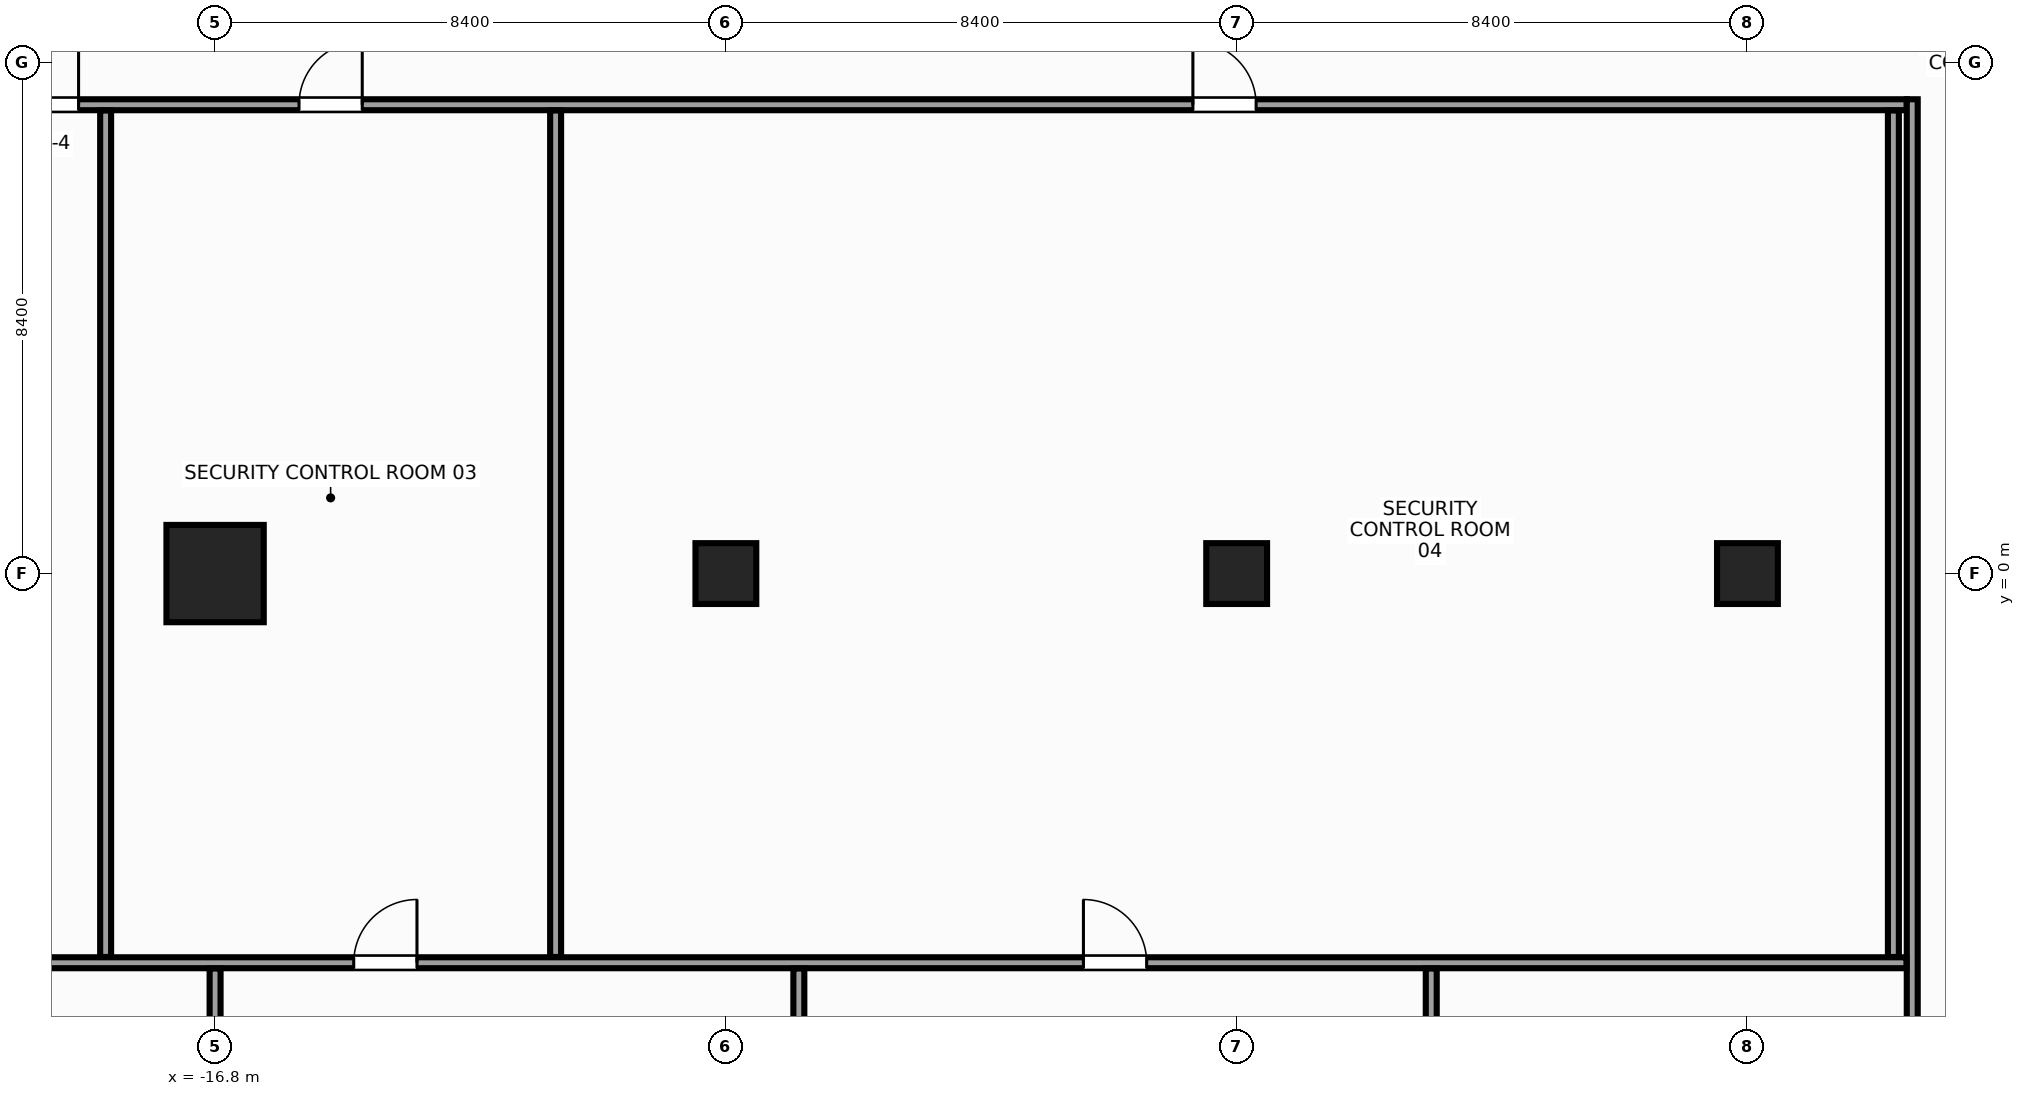
"""IFC4 building model, lengths in metres.
Left out: names, types, materials, properties, quantities, classifications, styles, units other than length and angle.
Written with IfcOpenShell. Run it as: python <this file> out.ifc"""

import sys

from ifc_helpers import new_model, si_unit, direction, frame, frame_2d, origin, origin_with_axes, origin_2d, place, context, subcontext, project, spatial, rectangle, hollow_rectangle, extrude, source, transform, mapped, element, fill, save


model = new_model("IFC4")
c1 = context("Model", 3, precision=1e-05, world=origin(), true_north=direction((0.0, 1.0)))
c2 = subcontext(c1, "Body", "Model", "MODEL_VIEW")
j1 = project(units=[si_unit("LENGTHUNIT", "METRE"), si_unit("PLANEANGLEUNIT", "RADIAN")], contexts=[c1])
p1 = place(None, origin())
s1 = spatial("IfcSite", under=j1, at=p1, CompositionType="ELEMENT")
p2 = place(p1, origin())
s2 = spatial("IfcBuilding", under=s1, at=p2, CompositionType="ELEMENT")
p3 = place(p2, frame((0.0, 0.0, 167.6)))
s3 = spatial("IfcBuildingStorey", under=s2, at=p3, CompositionType="ELEMENT", Elevation=167.6)
m1 = source(origin(), c2, "Body", "SweptSolid", [
    extrude(rectangle(XDim=1.6, YDim=1.6, at=origin_2d()), origin(), (0.0, 0.0, 1.0), 3.6),
])
p4 = place(p3, frame((-16.8, 0.0, 0.0), z_axis=(0.0, 0.0, 1.0), x_axis=(1.0, 0.0, 0.0)))
e1 = element("IfcColumn", 1, at=p4, inside=s3, PredefinedType="COLUMN", context=c2, shape_type="MappedRepresentation", body=[
    mapped(m1, transform((0.0, 0.0, 0.0), x_axis=(1.0, 0.0, 0.0), y_axis=(0.0, 1.0, 0.0), z_axis=(0.0, 0.0, 1.0), scale=1.0)),
])
m2 = source(origin(), c2, "Body", "SweptSolid", [
    extrude(hollow_rectangle(XDim=1.0, YDim=1.0, WallThickness=0.045, at=origin_2d()), origin(), (0.0, 0.0, 1.0), 3.6),
])
for number, where, z_axis, x_axis in (
    (2, (-8.4, 0.0, 0.0), (0.0, 0.0, 1.0), (1.0, 0.0, 0.0)),
    (3, (8.4, 0.0, 0.0), (0.0, 0.0, 1.0), (1.0, 0.0, 0.0)),
):
    element("IfcColumn", number, at=place(p3, frame(where, z_axis=z_axis, x_axis=x_axis)), inside=s3, PredefinedType="COLUMN", context=c2, shape_type="MappedRepresentation", body=[
        mapped(m2, transform((0.0, 0.0, 0.0), x_axis=(1.0, 0.0, 0.0), y_axis=(0.0, 1.0, 0.0), z_axis=(0.0, 0.0, 1.0), scale=1.0)),
    ])
m3 = source(origin(), c2, "Body", "SweptSolid", [
    extrude(rectangle(XDim=1.0, YDim=1.0, at=origin_2d()), origin(), (0.0, 0.0, 1.0), 3.6),
])
p5 = place(p3, origin_with_axes())
e4 = element("IfcColumn", 4, at=p5, inside=s3, PredefinedType="COLUMN", context=c2, shape_type="MappedRepresentation", body=[
    mapped(m3, transform((0.0, 0.0, 0.0), x_axis=(1.0, 0.0, 0.0), y_axis=(0.0, 1.0, 0.0), z_axis=(0.0, 0.0, 1.0), scale=1.0)),
])
m4 = source(origin(), c2, "Body", "SweptSolid", [
    extrude(rectangle(XDim=31.6, YDim=0.18, at=frame_2d((15.8, 0.0))), origin(), (0.0, 0.0, 1.0), 2.765),
])
p6 = place(p3, frame((-20.58, 7.71, 0.0), z_axis=(0.0, 0.0, 1.0), x_axis=(1.0, 0.0, 0.0)))
e5 = element("IfcWall", 5, at=p6, inside=s3, PredefinedType="PARTITIONING", context=c2, shape_type="MappedRepresentation", body=[
    mapped(m4, transform((0.0, 0.0, 0.0), x_axis=(1.0, 0.0, 0.0), y_axis=(0.0, 1.0, 0.0), z_axis=(0.0, 0.0, 1.0), scale=1.0)),
])
p7 = place(p6, frame((0.495, 0.0, 0.0)))
e6 = element("IfcOpeningElement", 6, at=p7, cuts=e5, PredefinedType="OPENING", context=c2, shape_type="SweptSolid", body=[
    extrude(rectangle(XDim=1.04, YDim=2.2, at=frame_2d((0.52, 1.1))), frame((0.0, 0.102, 0.0), z_axis=(0.0, -1.0, 0.0), x_axis=(1.0, 0.0, 0.0)), (0.0, 0.0, 1.0), 0.204),
])
p8 = place(p6, frame((5.16, 0.0, 0.0)))
e7 = element("IfcOpeningElement", 7, at=p8, cuts=e5, PredefinedType="OPENING", context=c2, shape_type="SweptSolid", body=[
    extrude(rectangle(XDim=1.04, YDim=2.2, at=frame_2d((0.52, 1.1))), frame((0.0, 0.102, 0.0), z_axis=(0.0, -1.0, 0.0), x_axis=(1.0, 0.0, 0.0)), (0.0, 0.0, 1.0), 0.204),
])
p9 = place(p6, frame((19.86, 0.0, 0.0)))
e8 = element("IfcOpeningElement", 8, at=p9, cuts=e5, PredefinedType="OPENING", context=c2, shape_type="SweptSolid", body=[
    extrude(rectangle(XDim=1.04, YDim=2.2, at=frame_2d((0.52, 1.1))), frame((0.0, 0.102, 0.0), z_axis=(0.0, -1.0, 0.0), x_axis=(1.0, 0.0, 0.0)), (0.0, 0.0, 1.0), 0.204),
])
m5 = source(origin(), c2, "Body", "SweptSolid", [
    extrude(rectangle(XDim=22.595, YDim=0.18, at=frame_2d((11.297, 0.0))), origin(), (0.0, 0.0, 1.0), 2.665),
])
p10 = place(p3, frame((11.11, -14.795, 0.0), z_axis=(0.0, 0.0, 1.0), x_axis=(0.0, 1.0, 0.0)))
e9 = element("IfcWall", 9, at=p10, inside=s3, PredefinedType="PARTITIONING", context=c2, shape_type="MappedRepresentation", body=[
    mapped(m5, transform((0.0, 0.0, 0.0), x_axis=(1.0, 0.0, 0.0), y_axis=(0.0, 1.0, 0.0), z_axis=(0.0, 0.0, 1.0), scale=1.0)),
])
m6 = source(origin(), c2, "Body", "SweptSolid", [
    extrude(rectangle(XDim=34.865, YDim=0.18, at=frame_2d((17.433, 0.0))), origin(), (0.0, 0.0, 1.0), 2.765),
])
p11 = place(p3, frame((-23.85, -6.4, 0.0), z_axis=(0.0, 0.0, 1.0), x_axis=(1.0, 0.0, 0.0)))
e10 = element("IfcWall", 10, at=p11, inside=s3, PredefinedType="PARTITIONING", context=c2, shape_type="MappedRepresentation", body=[
    mapped(m6, transform((0.0, 0.0, 0.0), x_axis=(1.0, 0.0, 0.0), y_axis=(0.0, 1.0, 0.0), z_axis=(0.0, 0.0, 1.0), scale=1.0)),
])
p12 = place(p11, frame((1.9, 0.0, 0.0)))
e11 = element("IfcOpeningElement", 11, at=p12, cuts=e10, PredefinedType="OPENING", context=c2, shape_type="SweptSolid", body=[
    extrude(rectangle(XDim=1.04, YDim=2.2, at=frame_2d((0.52, 1.1))), frame((0.0, 0.102, 0.0), z_axis=(0.0, -1.0, 0.0), x_axis=(1.0, 0.0, 0.0)), (0.0, 0.0, 1.0), 0.204),
])
p13 = place(p11, frame((9.33, 0.0, 0.0)))
e12 = element("IfcOpeningElement", 12, at=p13, cuts=e10, PredefinedType="OPENING", context=c2, shape_type="SweptSolid", body=[
    extrude(rectangle(XDim=1.04, YDim=2.2, at=frame_2d((0.52, 1.1))), frame((0.0, 0.102, 0.0), z_axis=(0.0, -1.0, 0.0), x_axis=(1.0, 0.0, 0.0)), (0.0, 0.0, 1.0), 0.204),
])
p14 = place(p11, frame((21.33, 0.0, 0.0)))
e13 = element("IfcOpeningElement", 13, at=p14, cuts=e10, PredefinedType="OPENING", context=c2, shape_type="SweptSolid", body=[
    extrude(rectangle(XDim=1.04, YDim=2.2, at=frame_2d((0.52, 1.1))), frame((0.0, 0.102, 0.0), z_axis=(0.0, -1.0, 0.0), x_axis=(1.0, 0.0, 0.0)), (0.0, 0.0, 1.0), 0.204),
])
m7 = source(origin(), c2, "Body", "SweptSolid", [
    extrude(rectangle(XDim=13.92, YDim=0.18, at=frame_2d((6.96, 0.0))), origin(), (0.0, 0.0, 1.0), 2.915),
])
p15 = place(p3, frame((-18.6, -6.305, 0.0), z_axis=(0.0, 0.0, 1.0), x_axis=(0.0, 1.0, 0.0)))
e14 = element("IfcWall", 14, at=p15, inside=s3, PredefinedType="PARTITIONING", context=c2, shape_type="MappedRepresentation", body=[
    mapped(m7, transform((0.0, 0.0, 0.0), x_axis=(1.0, 0.0, 0.0), y_axis=(0.0, 1.0, 0.0), z_axis=(0.0, 0.0, 1.0), scale=1.0)),
])
m8 = source(origin(), c2, "Body", "SweptSolid", [
    extrude(rectangle(XDim=13.92, YDim=0.18, at=frame_2d((6.96, 0.0))), origin(), (0.0, 0.0, 1.0), 2.665),
])
for number, where, z_axis, x_axis in (
    (15, (-11.2, -6.305, 0.0), (0.0, 0.0, 1.0), (0.0, 1.0, 0.0)),
    (16, (10.8, -6.305, 0.0), (0.0, 0.0, 1.0), (0.0, 1.0, 0.0)),
):
    element("IfcWall", number, at=place(p3, frame(where, z_axis=z_axis, x_axis=x_axis)), inside=s3, PredefinedType="PARTITIONING", context=c2, shape_type="MappedRepresentation", body=[
        mapped(m8, transform((0.0, 0.0, 0.0), x_axis=(1.0, 0.0, 0.0), y_axis=(0.0, 1.0, 0.0), z_axis=(0.0, 0.0, 1.0), scale=1.0)),
    ])
m9 = source(origin(), c2, "Body", "SweptSolid", [
    extrude(rectangle(XDim=3.495, YDim=0.18, at=frame_2d((1.748, 0.0))), origin(), (0.0, 0.0, 1.0), 2.765),
])
p16 = place(p3, frame((-16.8, -9.99, 0.0), z_axis=(0.0, 0.0, 1.0), x_axis=(0.0, 1.0, 0.0)))
e17 = element("IfcWall", 17, at=p16, inside=s3, PredefinedType="PARTITIONING", context=c2, shape_type="MappedRepresentation", body=[
    mapped(m9, transform((0.0, 0.0, 0.0), x_axis=(1.0, 0.0, 0.0), y_axis=(0.0, 1.0, 0.0), z_axis=(0.0, 0.0, 1.0), scale=1.0)),
])
m10 = source(origin(), c2, "Body", "SweptSolid", [
    extrude(rectangle(XDim=16.155, YDim=0.18, at=frame_2d((8.077, 0.0))), origin(), (0.0, 0.0, 1.0), 2.915),
])
for number, where, z_axis, x_axis in (
    (18, (-7.2, -22.65, 0.0), (0.0, 0.0, 1.0), (0.0, 1.0, 0.0)),
    (19, (3.2, -22.65, 0.0), (0.0, 0.0, 1.0), (0.0, 1.0, 0.0)),
):
    element("IfcWall", number, at=place(p3, frame(where, z_axis=z_axis, x_axis=x_axis)), inside=s3, PredefinedType="PARTITIONING", context=c2, shape_type="MappedRepresentation", body=[
        mapped(m10, transform((0.0, 0.0, 0.0), x_axis=(1.0, 0.0, 0.0), y_axis=(0.0, 1.0, 0.0), z_axis=(0.0, 0.0, 1.0), scale=1.0)),
    ])
m11 = source(origin(), c2, "Body", "SweptSolid", [
    extrude(rectangle(XDim=1.04, YDim=2.2, at=frame_2d((0.52, 1.1))), frame((0.0, 0.025, 0.0), z_axis=(0.0, -1.0, 0.0), x_axis=(1.0, 0.0, 0.0)), (0.0, 0.0, 1.0), 0.05),
])
p17 = place(p7, origin())
e20 = element("IfcDoor", 20, at=p17, inside=s3, OperationType="SINGLE_SWING_RIGHT", PredefinedType="DOOR", context=c2, shape_type="MappedRepresentation", body=[
    mapped(m11, transform((0.0, 0.0, 0.0), x_axis=(1.0, 0.0, 0.0), y_axis=(0.0, 1.0, 0.0), z_axis=(0.0, 0.0, 1.0), scale=1.0)),
])
fill(e6, e20)
p18 = place(p8, origin())
e21 = element("IfcDoor", 21, at=p18, inside=s3, OperationType="SINGLE_SWING_RIGHT", PredefinedType="DOOR", context=c2, shape_type="MappedRepresentation", body=[
    mapped(m11, transform((0.0, 0.0, 0.0), x_axis=(1.0, 0.0, 0.0), y_axis=(0.0, 1.0, 0.0), z_axis=(0.0, 0.0, 1.0), scale=1.0)),
])
fill(e7, e21)
p19 = place(p9, origin())
e22 = element("IfcDoor", 22, at=p19, inside=s3, OperationType="SINGLE_SWING_LEFT", PredefinedType="DOOR", context=c2, shape_type="MappedRepresentation", body=[
    mapped(m11, transform((0.0, 0.0, 0.0), x_axis=(1.0, 0.0, 0.0), y_axis=(0.0, 1.0, 0.0), z_axis=(0.0, 0.0, 1.0), scale=1.0)),
])
fill(e8, e22)
p20 = place(p13, origin())
e23 = element("IfcDoor", 23, at=p20, inside=s3, OperationType="SINGLE_SWING_RIGHT", PredefinedType="DOOR", context=c2, shape_type="MappedRepresentation", body=[
    mapped(m11, transform((0.0, 0.0, 0.0), x_axis=(1.0, 0.0, 0.0), y_axis=(0.0, 1.0, 0.0), z_axis=(0.0, 0.0, 1.0), scale=1.0)),
])
fill(e12, e23)
p21 = place(p14, origin())
e24 = element("IfcDoor", 24, at=p21, inside=s3, OperationType="SINGLE_SWING_LEFT", PredefinedType="DOOR", context=c2, shape_type="MappedRepresentation", body=[
    mapped(m11, transform((0.0, 0.0, 0.0), x_axis=(1.0, 0.0, 0.0), y_axis=(0.0, 1.0, 0.0), z_axis=(0.0, 0.0, 1.0), scale=1.0)),
])
fill(e13, e24)
save(model, sys.argv[1])
